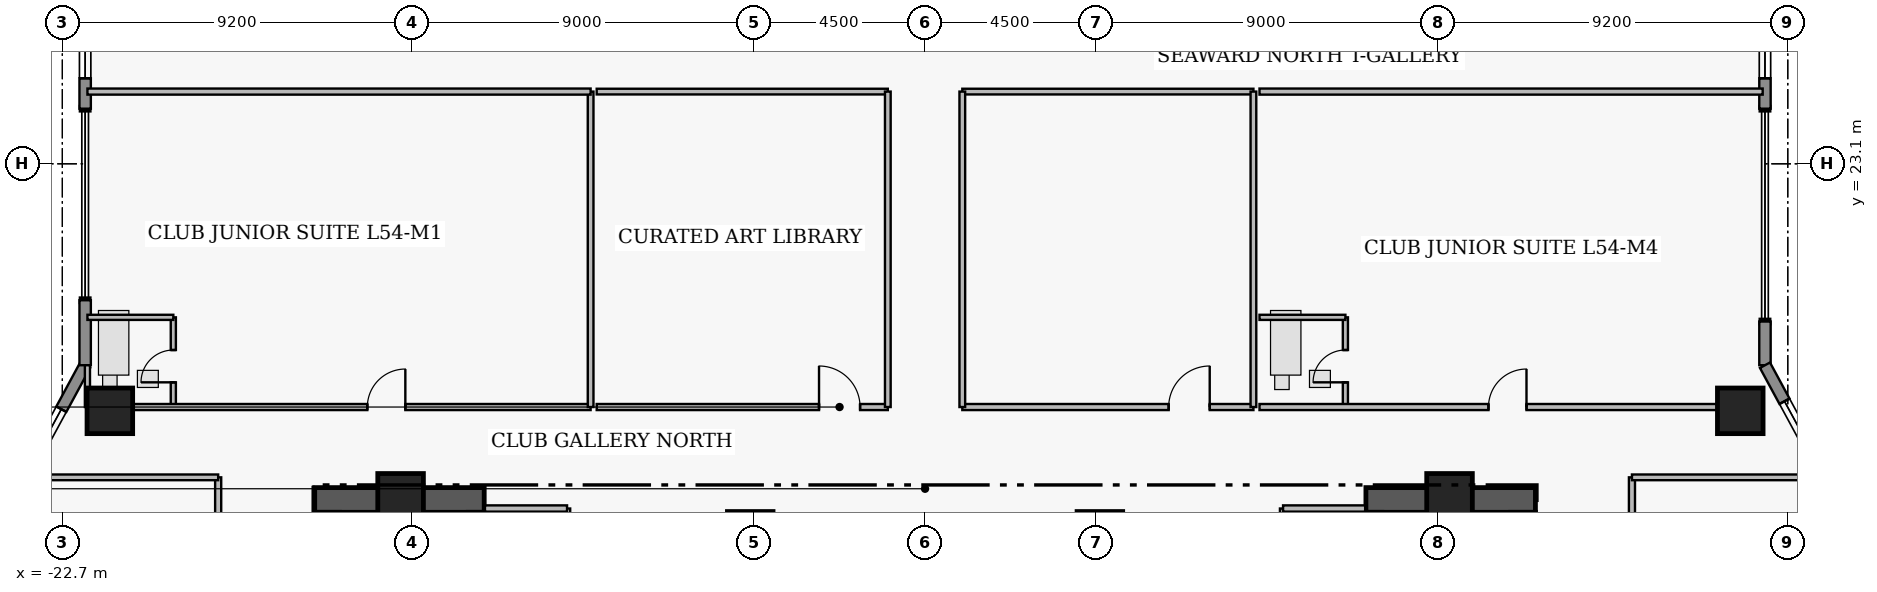
"""IFC4 building model, lengths in metres.
Left out: names, types, materials, properties, quantities, classifications, styles, units other than length and angle.
Written with IfcOpenShell. Run it as: python <this file> out.ifc"""

import sys

from ifc_helpers import new_model, si_unit, direction, frame, frame_2d, origin, origin_2d, place, context, subcontext, project, spatial, rectangle, extrude, element, fill, save


model = new_model("IFC4")
c1 = context("Model", 3, precision=1e-05, world=origin(), true_north=direction((0.0, 1.0)))
c2 = subcontext(c1, "Body", "Model", "MODEL_VIEW")
j1 = project(units=[si_unit("LENGTHUNIT", "METRE"), si_unit("PLANEANGLEUNIT", "RADIAN")], contexts=[c1])
p1 = place(None, origin())
s1 = spatial("IfcSite", under=j1, at=p1, CompositionType="ELEMENT")
p2 = place(p1, origin())
s2 = spatial("IfcBuilding", under=s1, at=p2, CompositionType="ELEMENT")
p3 = place(p2, frame((0.0, 0.0, 214.9)))
s3 = spatial("IfcBuildingStorey", under=s2, at=p3, CompositionType="ELEMENT", Elevation=214.9)
for number, where, z_axis, x_axis in (
    (1, (-16.06, 14.255, 0.0), (0.0, 0.0, 1.0), (1.0, 0.0, 0.0)),
    (2, (11.6, 14.255, 0.0), (0.0, 0.0, 1.0), (1.0, 0.0, 0.0)),
):
    element("IfcWall", number, at=place(p3, frame(where, z_axis=z_axis, x_axis=x_axis)), inside=s3, PredefinedType="SHEAR", context=c2, shape_type="SweptSolid", body=[
        extrude(rectangle(XDim=4.46, YDim=0.65, at=frame_2d((2.23, 0.0))), origin(), (0.0, 0.0, 1.0), 3.56),
    ])
for number, where, z_axis, x_axis in (
    (3, (-13.8, 14.35, 0.0), (0.0, 0.0, 1.0), (1.0, 0.0, 0.0)),
    (4, (-4.6, 13.35, 0.0), (0.0, 0.0, 1.0), (1.0, 0.0, 0.0)),
    (5, (4.6, 13.35, 0.0), (0.0, 0.0, 1.0), (1.0, 0.0, 0.0)),
    (6, (13.8, 14.35, 0.0), (0.0, 0.0, 1.0), (1.0, 0.0, 0.0)),
    (7, (-21.45, 16.6, 0.0), (0.0, 0.0, 1.0), (1.0, 0.0, 0.0)),
    (8, (21.45, 16.6, 0.0), (0.0, 0.0, 1.0), (1.0, 0.0, 0.0)),
):
    element("IfcColumn", number, at=place(p3, frame(where, z_axis=z_axis, x_axis=x_axis)), inside=s3, PredefinedType="COLUMN", context=c2, shape_type="SweptSolid", body=[
        extrude(rectangle(XDim=1.2, YDim=1.2, at=origin_2d()), origin(), (0.0, 0.0, 1.0), 3.75),
    ])
p4 = place(p3, frame((-24.7, 13.0, 0.0), z_axis=(0.0, 0.0, 1.0), x_axis=(0.476258655584, 0.879305233114, 0.0)))
e9 = element("IfcWall", 9, at=p4, inside=s3, PredefinedType="STANDARD", context=c2, shape_type="SweptSolid", body=[
    extrude(rectangle(XDim=5.459, YDim=0.3, at=frame_2d((2.729, 0.0))), origin(), (0.0, 0.0, 1.0), 3.53),
])
p5 = place(p4, frame((2.993, 0.0, 1.25)))
e10 = element("IfcOpeningElement", 10, at=p5, cuts=e9, PredefinedType="OPENING", context=c2, shape_type="SweptSolid", body=[
    extrude(rectangle(XDim=1.15, YDim=1.55, at=frame_2d((0.575, 0.775))), frame((0.0, 0.16, 0.0), z_axis=(0.0, -1.0, 0.0), x_axis=(1.0, 0.0, 0.0)), (0.0, 0.0, 1.0), 0.32),
])
p6 = place(p3, frame((-22.1, 17.8, 0.0), z_axis=(0.0, 0.0, 1.0), x_axis=(0.0, 1.0, 0.0)))
e11 = element("IfcWall", 11, at=p6, inside=s3, PredefinedType="STANDARD", context=c2, shape_type="SweptSolid", body=[
    extrude(rectangle(XDim=1.71, YDim=0.3, at=frame_2d((0.855, 0.0))), origin(), (0.0, 0.0, 1.0), 3.53),
])
p7 = place(p3, frame((-22.1, 24.55, 0.0), z_axis=(0.0, 0.0, 1.0), x_axis=(0.0, 1.0, 0.0)))
e12 = element("IfcWall", 12, at=p7, inside=s3, PredefinedType="STANDARD", context=c2, shape_type="SweptSolid", body=[
    extrude(rectangle(XDim=5.65, YDim=0.3, at=frame_2d((2.825, 0.0))), origin(), (0.0, 0.0, 1.0), 3.53),
])
p8 = place(p7, frame((0.8, 0.0, 0.95)))
e13 = element("IfcOpeningElement", 13, at=p8, cuts=e12, PredefinedType="OPENING", context=c2, shape_type="SweptSolid", body=[
    extrude(rectangle(XDim=1.15, YDim=1.55, at=frame_2d((0.575, 0.775))), frame((0.0, 0.16, 0.0), z_axis=(0.0, -1.0, 0.0), x_axis=(1.0, 0.0, 0.0)), (0.0, 0.0, 1.0), 0.32),
])
p9 = place(p7, frame((2.905, 0.0, 0.95)))
e14 = element("IfcOpeningElement", 14, at=p9, cuts=e12, PredefinedType="OPENING", context=c2, shape_type="SweptSolid", body=[
    extrude(rectangle(XDim=1.15, YDim=1.55, at=frame_2d((0.575, 0.775))), frame((0.0, 0.16, 0.0), z_axis=(0.0, -1.0, 0.0), x_axis=(1.0, 0.0, 0.0)), (0.0, 0.0, 1.0), 0.32),
])
p10 = place(p3, frame((22.1, 30.2, 0.0), z_axis=(0.0, 0.0, 1.0), x_axis=(0.0, -1.0, 0.0)))
e15 = element("IfcWall", 15, at=p10, inside=s3, PredefinedType="STANDARD", context=c2, shape_type="SweptSolid", body=[
    extrude(rectangle(XDim=5.65, YDim=0.3, at=frame_2d((2.825, 0.0))), origin(), (0.0, 0.0, 1.0), 3.53),
])
p11 = place(p10, frame((0.935, 0.0, 0.85)))
e16 = element("IfcOpeningElement", 16, at=p11, cuts=e15, PredefinedType="OPENING", context=c2, shape_type="SweptSolid", body=[
    extrude(rectangle(XDim=1.6, YDim=1.8, at=frame_2d((0.8, 0.9))), frame((0.0, 0.16, 0.0), z_axis=(0.0, -1.0, 0.0), x_axis=(1.0, 0.0, 0.0)), (0.0, 0.0, 1.0), 0.32),
])
p12 = place(p10, frame((3.7, 0.0, 0.95)))
e17 = element("IfcOpeningElement", 17, at=p12, cuts=e15, PredefinedType="OPENING", context=c2, shape_type="SweptSolid", body=[
    extrude(rectangle(XDim=1.15, YDim=1.55, at=frame_2d((0.575, 0.775))), frame((0.0, 0.16, 0.0), z_axis=(0.0, -1.0, 0.0), x_axis=(1.0, 0.0, 0.0)), (0.0, 0.0, 1.0), 0.32),
])
p13 = place(p3, frame((22.1, 18.95, 0.0), z_axis=(0.0, 0.0, 1.0), x_axis=(0.0, -1.0, 0.0)))
e18 = element("IfcWall", 18, at=p13, inside=s3, PredefinedType="STANDARD", context=c2, shape_type="SweptSolid", body=[
    extrude(rectangle(XDim=1.15, YDim=0.3, at=frame_2d((0.575, 0.0))), origin(), (0.0, 0.0, 1.0), 3.53),
])
p14 = place(p3, frame((22.1, 17.8, 0.0), z_axis=(0.0, 0.0, 1.0), x_axis=(0.476258655584, -0.879305233114, 0.0)))
e19 = element("IfcWall", 19, at=p14, inside=s3, PredefinedType="STANDARD", context=c2, shape_type="SweptSolid", body=[
    extrude(rectangle(XDim=5.459, YDim=0.3, at=frame_2d((2.729, 0.0))), origin(), (0.0, 0.0, 1.0), 3.53),
])
p15 = place(p14, frame((1.078, 0.0, 1.25)))
e20 = element("IfcOpeningElement", 20, at=p15, cuts=e19, PredefinedType="OPENING", context=c2, shape_type="SweptSolid", body=[
    extrude(rectangle(XDim=1.15, YDim=1.55, at=frame_2d((0.575, 0.775))), frame((0.0, 0.16, 0.0), z_axis=(0.0, -1.0, 0.0), x_axis=(1.0, 0.0, 0.0)), (0.0, 0.0, 1.0), 0.32),
])
p16 = place(p3, frame((-19.78, 16.7, 0.0), z_axis=(0.0, 0.0, 1.0), x_axis=(0.0, 1.0, 0.0)))
e21 = element("IfcWall", 21, at=p16, inside=s3, PredefinedType="PLUMBINGWALL", context=c2, shape_type="SweptSolid", body=[
    extrude(rectangle(XDim=2.36, YDim=0.135, at=frame_2d((1.18, 0.0))), origin(), (0.0, 0.0, 1.0), 3.53),
])
p17 = place(p16, frame((0.65, 0.0, 0.0)))
e22 = element("IfcOpeningElement", 22, at=p17, cuts=e21, PredefinedType="OPENING", context=c2, shape_type="SweptSolid", body=[
    extrude(rectangle(XDim=0.85, YDim=2.1, at=frame_2d((0.425, 1.05))), frame((0.0, 0.077, 0.0), z_axis=(0.0, -1.0, 0.0), x_axis=(1.0, 0.0, 0.0)), (0.0, 0.0, 1.0), 0.155),
])
p18 = place(p3, frame((-22.04, 16.7, 0.0), z_axis=(0.0, 0.0, 1.0), x_axis=(1.0, 0.0, 0.0)))
e23 = element("IfcWall", 23, at=p18, inside=s3, PredefinedType="PARTITIONING", context=c2, shape_type="SweptSolid", body=[
    extrude(rectangle(XDim=13.24, YDim=0.16, at=frame_2d((6.62, 0.0))), origin(), (0.0, 0.0, 1.0), 3.124),
])
p19 = place(p18, frame((7.365, 0.0, 0.0)))
e24 = element("IfcOpeningElement", 24, at=p19, cuts=e23, PredefinedType="OPENING", context=c2, shape_type="SweptSolid", body=[
    extrude(rectangle(XDim=1.0, YDim=2.15, at=frame_2d((0.5, 1.075))), frame((0.0, 0.09, 0.0), z_axis=(0.0, -1.0, 0.0), x_axis=(1.0, 0.0, 0.0)), (0.0, 0.0, 1.0), 0.18),
])
p20 = place(p3, frame((-8.64, 16.7, 0.0), z_axis=(0.0, 0.0, 1.0), x_axis=(1.0, 0.0, 0.0)))
e25 = element("IfcWall", 25, at=p20, inside=s3, PredefinedType="PARTITIONING", context=c2, shape_type="SweptSolid", body=[
    extrude(rectangle(XDim=7.66, YDim=0.16, at=frame_2d((3.83, 0.0))), origin(), (0.0, 0.0, 1.0), 3.124),
])
p21 = place(p20, frame((5.85, 0.0, 0.0)))
e26 = element("IfcOpeningElement", 26, at=p21, cuts=e25, PredefinedType="OPENING", context=c2, shape_type="SweptSolid", body=[
    extrude(rectangle(XDim=1.08, YDim=2.18, at=frame_2d((0.54, 1.09))), frame((0.0, 0.09, 0.0), z_axis=(0.0, -1.0, 0.0), x_axis=(1.0, 0.0, 0.0)), (0.0, 0.0, 1.0), 0.18),
])
p22 = place(p3, frame((0.98, 16.7, 0.0), z_axis=(0.0, 0.0, 1.0), x_axis=(1.0, 0.0, 0.0)))
e27 = element("IfcWall", 27, at=p22, inside=s3, PredefinedType="PARTITIONING", context=c2, shape_type="SweptSolid", body=[
    extrude(rectangle(XDim=7.66, YDim=0.16, at=frame_2d((3.83, 0.0))), origin(), (0.0, 0.0, 1.0), 3.124),
])
p23 = place(p22, frame((5.43, 0.0, 0.0)))
e28 = element("IfcOpeningElement", 28, at=p23, cuts=e27, PredefinedType="OPENING", context=c2, shape_type="SweptSolid", body=[
    extrude(rectangle(XDim=1.08, YDim=2.18, at=frame_2d((0.54, 1.09))), frame((0.0, 0.09, 0.0), z_axis=(0.0, -1.0, 0.0), x_axis=(1.0, 0.0, 0.0)), (0.0, 0.0, 1.0), 0.18),
])
p24 = place(p3, frame((11.06, 16.7, 0.0), z_axis=(0.0, 0.0, 1.0), x_axis=(0.0, 1.0, 0.0)))
e29 = element("IfcWall", 29, at=p24, inside=s3, PredefinedType="PLUMBINGWALL", context=c2, shape_type="SweptSolid", body=[
    extrude(rectangle(XDim=2.36, YDim=0.135, at=frame_2d((1.18, 0.0))), origin(), (0.0, 0.0, 1.0), 3.53),
])
p25 = place(p24, frame((0.65, 0.0, 0.0)))
e30 = element("IfcOpeningElement", 30, at=p25, cuts=e29, PredefinedType="OPENING", context=c2, shape_type="SweptSolid", body=[
    extrude(rectangle(XDim=0.85, YDim=2.1, at=frame_2d((0.425, 1.05))), frame((0.0, 0.077, 0.0), z_axis=(0.0, -1.0, 0.0), x_axis=(1.0, 0.0, 0.0)), (0.0, 0.0, 1.0), 0.155),
])
p26 = place(p3, frame((8.8, 16.7, 0.0), z_axis=(0.0, 0.0, 1.0), x_axis=(1.0, 0.0, 0.0)))
e31 = element("IfcWall", 31, at=p26, inside=s3, PredefinedType="PARTITIONING", context=c2, shape_type="SweptSolid", body=[
    extrude(rectangle(XDim=13.24, YDim=0.16, at=frame_2d((6.62, 0.0))), origin(), (0.0, 0.0, 1.0), 3.124),
])
p27 = place(p26, frame((6.025, 0.0, 0.0)))
e32 = element("IfcOpeningElement", 32, at=p27, cuts=e31, PredefinedType="OPENING", context=c2, shape_type="SweptSolid", body=[
    extrude(rectangle(XDim=1.0, YDim=2.15, at=frame_2d((0.5, 1.075))), frame((0.0, 0.09, 0.0), z_axis=(0.0, -1.0, 0.0), x_axis=(1.0, 0.0, 0.0)), (0.0, 0.0, 1.0), 0.18),
])
p28 = place(p3, frame((18.6, 6.91, 0.0), z_axis=(0.0, 0.0, 1.0), x_axis=(0.0, 1.0, 0.0)))
e33 = element("IfcWall", 33, at=p28, inside=s3, PredefinedType="PARTITIONING", context=c2, shape_type="SweptSolid", body=[
    extrude(rectangle(XDim=7.94, YDim=0.16, at=frame_2d((3.97, 0.0))), origin(), (0.0, 0.0, 1.0), 3.53),
])
p29 = place(p28, frame((3.51, 0.0, 0.0)))
e34 = element("IfcOpeningElement", 34, at=p29, cuts=e33, PredefinedType="OPENING", context=c2, shape_type="SweptSolid", body=[
    extrude(rectangle(XDim=0.92, YDim=2.12, at=frame_2d((0.46, 1.06))), frame((0.0, 0.09, 0.0), z_axis=(0.0, -1.0, 0.0), x_axis=(1.0, 0.0, 0.0)), (0.0, 0.0, 1.0), 0.18),
])
p30 = place(p3, frame((-18.6, 1.55, 0.0), z_axis=(0.0, 0.0, 1.0), x_axis=(0.0, 1.0, 0.0)))
e35 = element("IfcWall", 35, at=p30, inside=s3, PredefinedType="PARTITIONING", context=c2, shape_type="SweptSolid", body=[
    extrude(rectangle(XDim=13.3, YDim=0.16, at=frame_2d((6.65, 0.0))), origin(), (0.0, 0.0, 1.0), 3.53),
])
p31 = place(p30, frame((6.175, 0.0, 0.0)))
e36 = element("IfcOpeningElement", 36, at=p31, cuts=e35, PredefinedType="OPENING", context=c2, shape_type="SweptSolid", body=[
    extrude(rectangle(XDim=0.95, YDim=2.15, at=frame_2d((0.475, 1.075))), frame((0.0, 0.09, 0.0), z_axis=(0.0, -1.0, 0.0), x_axis=(1.0, 0.0, 0.0)), (0.0, 0.0, 1.0), 0.18),
])
p32 = place(p3, frame((-9.42, 11.07, 0.0), z_axis=(0.0, 0.0, 1.0), x_axis=(0.0, 1.0, 0.0)))
e37 = element("IfcWall", 37, at=p32, inside=s3, PredefinedType="PARTITIONING", context=c2, shape_type="SweptSolid", body=[
    extrude(rectangle(XDim=2.96, YDim=0.165, at=frame_2d((1.48, 0.0))), origin(), (0.0, 0.0, 1.0), 3.53),
])
p33 = place(p3, frame((-11.58, 14.03, 0.0), z_axis=(0.0, 0.0, 1.0), x_axis=(1.0, 0.0, 0.0)))
e38 = element("IfcWall", 38, at=p33, inside=s3, PredefinedType="PARTITIONING", context=c2, shape_type="SweptSolid", body=[
    extrude(rectangle(XDim=2.16, YDim=0.165, at=frame_2d((1.08, 0.0))), origin(), (0.0, 0.0, 1.0), 3.53),
])
p34 = place(p3, frame((9.42, 11.07, 0.0), z_axis=(0.0, 0.0, 1.0), x_axis=(0.0, 1.0, 0.0)))
e39 = element("IfcWall", 39, at=p34, inside=s3, PredefinedType="PARTITIONING", context=c2, shape_type="SweptSolid", body=[
    extrude(rectangle(XDim=2.96, YDim=0.165, at=frame_2d((1.48, 0.0))), origin(), (0.0, 0.0, 1.0), 3.53),
])
p35 = place(p3, frame((9.42, 14.03, 0.0), z_axis=(0.0, 0.0, 1.0), x_axis=(1.0, 0.0, 0.0)))
e40 = element("IfcWall", 40, at=p35, inside=s3, PredefinedType="PARTITIONING", context=c2, shape_type="SweptSolid", body=[
    extrude(rectangle(XDim=2.16, YDim=0.165, at=frame_2d((1.08, 0.0))), origin(), (0.0, 0.0, 1.0), 3.53),
])
p36 = place(p3, frame((-22.04, 19.06, 0.0), z_axis=(0.0, 0.0, 1.0), x_axis=(1.0, 0.0, 0.0)))
e41 = element("IfcWall", 41, at=p36, inside=s3, PredefinedType="PLUMBINGWALL", context=c2, shape_type="SweptSolid", body=[
    extrude(rectangle(XDim=2.26, YDim=0.135, at=frame_2d((1.13, 0.0))), origin(), (0.0, 0.0, 1.0), 3.53),
])
p37 = place(p3, frame((-22.04, 16.7, 0.0), z_axis=(0.0, 0.0, 1.0), x_axis=(0.0, 1.0, 0.0)))
e42 = element("IfcWall", 42, at=p37, inside=s3, PredefinedType="PLUMBINGWALL", context=c2, shape_type="SweptSolid", body=[
    extrude(rectangle(XDim=1.1, YDim=0.135, at=frame_2d((0.55, 0.0))), origin(), (0.0, 0.0, 1.0), 3.53),
])
p38 = place(p3, frame((-8.8, 16.7, 0.0), z_axis=(0.0, 0.0, 1.0), x_axis=(0.0, 1.0, 0.0)))
e43 = element("IfcWall", 43, at=p38, inside=s3, PredefinedType="PARTITIONING", context=c2, shape_type="SweptSolid", body=[
    extrude(rectangle(XDim=8.3, YDim=0.15, at=frame_2d((4.15, 0.0))), origin(), (0.0, 0.0, 1.0), 3.53),
])
p39 = place(p3, frame((-22.04, 25.0, 0.0), z_axis=(0.0, 0.0, 1.0), x_axis=(1.0, 0.0, 0.0)))
e44 = element("IfcWall", 44, at=p39, inside=s3, PredefinedType="PARTITIONING", context=c2, shape_type="SweptSolid", body=[
    extrude(rectangle(XDim=13.24, YDim=0.16, at=frame_2d((6.62, 0.0))), origin(), (0.0, 0.0, 1.0), 3.124),
])
p40 = place(p3, frame((-8.64, 25.0, 0.0), z_axis=(0.0, 0.0, 1.0), x_axis=(1.0, 0.0, 0.0)))
e45 = element("IfcWall", 45, at=p40, inside=s3, PredefinedType="PARTITIONING", context=c2, shape_type="SweptSolid", body=[
    extrude(rectangle(XDim=7.66, YDim=0.15, at=frame_2d((3.83, 0.0))), origin(), (0.0, 0.0, 1.0), 3.124),
])
p41 = place(p3, frame((-0.98, 16.7, 0.0), z_axis=(0.0, 0.0, 1.0), x_axis=(0.0, 1.0, 0.0)))
e46 = element("IfcWall", 46, at=p41, inside=s3, PredefinedType="PARTITIONING", context=c2, shape_type="SweptSolid", body=[
    extrude(rectangle(XDim=8.3, YDim=0.15, at=frame_2d((4.15, 0.0))), origin(), (0.0, 0.0, 1.0), 3.53),
])
p42 = place(p3, frame((0.98, 25.0, 0.0), z_axis=(0.0, 0.0, 1.0), x_axis=(1.0, 0.0, 0.0)))
e47 = element("IfcWall", 47, at=p42, inside=s3, PredefinedType="PARTITIONING", context=c2, shape_type="SweptSolid", body=[
    extrude(rectangle(XDim=7.66, YDim=0.15, at=frame_2d((3.83, 0.0))), origin(), (0.0, 0.0, 1.0), 3.124),
])
for number, where, z_axis, x_axis in (
    (48, (0.98, 16.7, 0.0), (0.0, 0.0, 1.0), (0.0, 1.0, 0.0)),
    (49, (8.64, 16.7, 0.0), (0.0, 0.0, 1.0), (0.0, 1.0, 0.0)),
):
    element("IfcWall", number, at=place(p3, frame(where, z_axis=z_axis, x_axis=x_axis)), inside=s3, PredefinedType="PARTITIONING", context=c2, shape_type="SweptSolid", body=[
        extrude(rectangle(XDim=8.3, YDim=0.15, at=frame_2d((4.15, 0.0))), origin(), (0.0, 0.0, 1.0), 3.53),
    ])
p43 = place(p3, frame((8.8, 19.06, 0.0), z_axis=(0.0, 0.0, 1.0), x_axis=(1.0, 0.0, 0.0)))
e50 = element("IfcWall", 50, at=p43, inside=s3, PredefinedType="PLUMBINGWALL", context=c2, shape_type="SweptSolid", body=[
    extrude(rectangle(XDim=2.26, YDim=0.135, at=frame_2d((1.13, 0.0))), origin(), (0.0, 0.0, 1.0), 3.124),
])
p44 = place(p3, frame((8.8, 25.0, 0.0), z_axis=(0.0, 0.0, 1.0), x_axis=(1.0, 0.0, 0.0)))
e51 = element("IfcWall", 51, at=p44, inside=s3, PredefinedType="PARTITIONING", context=c2, shape_type="SweptSolid", body=[
    extrude(rectangle(XDim=13.24, YDim=0.16, at=frame_2d((6.62, 0.0))), origin(), (0.0, 0.0, 1.0), 3.124),
])
for number, where, z_axis, x_axis in (
    (52, (18.6, 14.85, 0.0), (0.0, 0.0, 1.0), (1.0, 0.0, 0.0)),
    (53, (-23.638, 14.85, 0.0), (0.0, 0.0, 1.0), (1.0, 0.0, 0.0)),
):
    element("IfcWall", number, at=place(p3, frame(where, z_axis=z_axis, x_axis=x_axis)), inside=s3, PredefinedType="PARTITIONING", context=c2, shape_type="SweptSolid", body=[
        extrude(rectangle(XDim=5.038, YDim=0.15, at=frame_2d((2.519, 0.0))), origin(), (0.0, 0.0, 1.0), 3.53),
    ])
p45 = place(p5, origin())
e54 = element("IfcWindow", 54, at=p45, inside=s3, PartitioningType="SINGLE_PANEL", PredefinedType="WINDOW", context=c2, shape_type="SweptSolid", body=[
    extrude(rectangle(XDim=1.15, YDim=1.55, at=frame_2d((0.575, 0.775))), frame((0.0, 0.03, 0.0), z_axis=(0.0, -1.0, 0.0), x_axis=(1.0, 0.0, 0.0)), (0.0, 0.0, 1.0), 0.06),
])
fill(e10, e54)
p46 = place(p8, origin())
e55 = element("IfcWindow", 55, at=p46, inside=s3, PartitioningType="SINGLE_PANEL", PredefinedType="WINDOW", context=c2, shape_type="SweptSolid", body=[
    extrude(rectangle(XDim=1.15, YDim=1.55, at=frame_2d((0.575, 0.775))), frame((0.0, 0.03, 0.0), z_axis=(0.0, -1.0, 0.0), x_axis=(1.0, 0.0, 0.0)), (0.0, 0.0, 1.0), 0.06),
])
fill(e13, e55)
p47 = place(p12, origin())
e56 = element("IfcWindow", 56, at=p47, inside=s3, PartitioningType="SINGLE_PANEL", PredefinedType="WINDOW", context=c2, shape_type="SweptSolid", body=[
    extrude(rectangle(XDim=1.15, YDim=1.55, at=frame_2d((0.575, 0.775))), frame((0.0, 0.03, 0.0), z_axis=(0.0, -1.0, 0.0), x_axis=(1.0, 0.0, 0.0)), (0.0, 0.0, 1.0), 0.06),
])
fill(e17, e56)
p48 = place(p15, origin())
e57 = element("IfcWindow", 57, at=p48, inside=s3, PartitioningType="SINGLE_PANEL", PredefinedType="WINDOW", context=c2, shape_type="SweptSolid", body=[
    extrude(rectangle(XDim=1.15, YDim=1.55, at=frame_2d((0.575, 0.775))), frame((0.0, 0.03, 0.0), z_axis=(0.0, -1.0, 0.0), x_axis=(1.0, 0.0, 0.0)), (0.0, 0.0, 1.0), 0.06),
])
fill(e20, e57)
p49 = place(p17, origin())
e58 = element("IfcDoor", 58, at=p49, inside=s3, OperationType="SINGLE_SWING_LEFT", PredefinedType="DOOR", context=c2, shape_type="SweptSolid", body=[
    extrude(rectangle(XDim=0.85, YDim=2.1, at=frame_2d((0.425, 1.05))), frame((0.0, 0.025, 0.0), z_axis=(0.0, -1.0, 0.0), x_axis=(1.0, 0.0, 0.0)), (0.0, 0.0, 1.0), 0.05),
])
fill(e22, e58)
p50 = place(p19, origin())
e59 = element("IfcDoor", 59, at=p50, inside=s3, OperationType="SINGLE_SWING_RIGHT", PredefinedType="DOOR", context=c2, shape_type="SweptSolid", body=[
    extrude(rectangle(XDim=1.0, YDim=2.15, at=frame_2d((0.5, 1.075))), frame((0.0, 0.025, 0.0), z_axis=(0.0, -1.0, 0.0), x_axis=(1.0, 0.0, 0.0)), (0.0, 0.0, 1.0), 0.05),
])
fill(e24, e59)
p51 = place(p21, origin())
e60 = element("IfcDoor", 60, at=p51, inside=s3, OperationType="SINGLE_SWING_LEFT", PredefinedType="DOOR", context=c2, shape_type="SweptSolid", body=[
    extrude(rectangle(XDim=1.08, YDim=2.18, at=frame_2d((0.54, 1.09))), frame((0.0, 0.025, 0.0), z_axis=(0.0, -1.0, 0.0), x_axis=(1.0, 0.0, 0.0)), (0.0, 0.0, 1.0), 0.05),
])
fill(e26, e60)
p52 = place(p23, origin())
e61 = element("IfcDoor", 61, at=p52, inside=s3, OperationType="SINGLE_SWING_RIGHT", PredefinedType="DOOR", context=c2, shape_type="SweptSolid", body=[
    extrude(rectangle(XDim=1.08, YDim=2.18, at=frame_2d((0.54, 1.09))), frame((0.0, 0.025, 0.0), z_axis=(0.0, -1.0, 0.0), x_axis=(1.0, 0.0, 0.0)), (0.0, 0.0, 1.0), 0.05),
])
fill(e28, e61)
p53 = place(p25, origin())
e62 = element("IfcDoor", 62, at=p53, inside=s3, OperationType="SINGLE_SWING_LEFT", PredefinedType="DOOR", context=c2, shape_type="SweptSolid", body=[
    extrude(rectangle(XDim=0.85, YDim=2.1, at=frame_2d((0.425, 1.05))), frame((0.0, 0.025, 0.0), z_axis=(0.0, -1.0, 0.0), x_axis=(1.0, 0.0, 0.0)), (0.0, 0.0, 1.0), 0.05),
])
fill(e30, e62)
p54 = place(p27, origin())
e63 = element("IfcDoor", 63, at=p54, inside=s3, OperationType="SINGLE_SWING_RIGHT", PredefinedType="DOOR", context=c2, shape_type="SweptSolid", body=[
    extrude(rectangle(XDim=1.0, YDim=2.15, at=frame_2d((0.5, 1.075))), frame((0.0, 0.025, 0.0), z_axis=(0.0, -1.0, 0.0), x_axis=(1.0, 0.0, 0.0)), (0.0, 0.0, 1.0), 0.05),
])
fill(e32, e63)
save(model, sys.argv[1])
